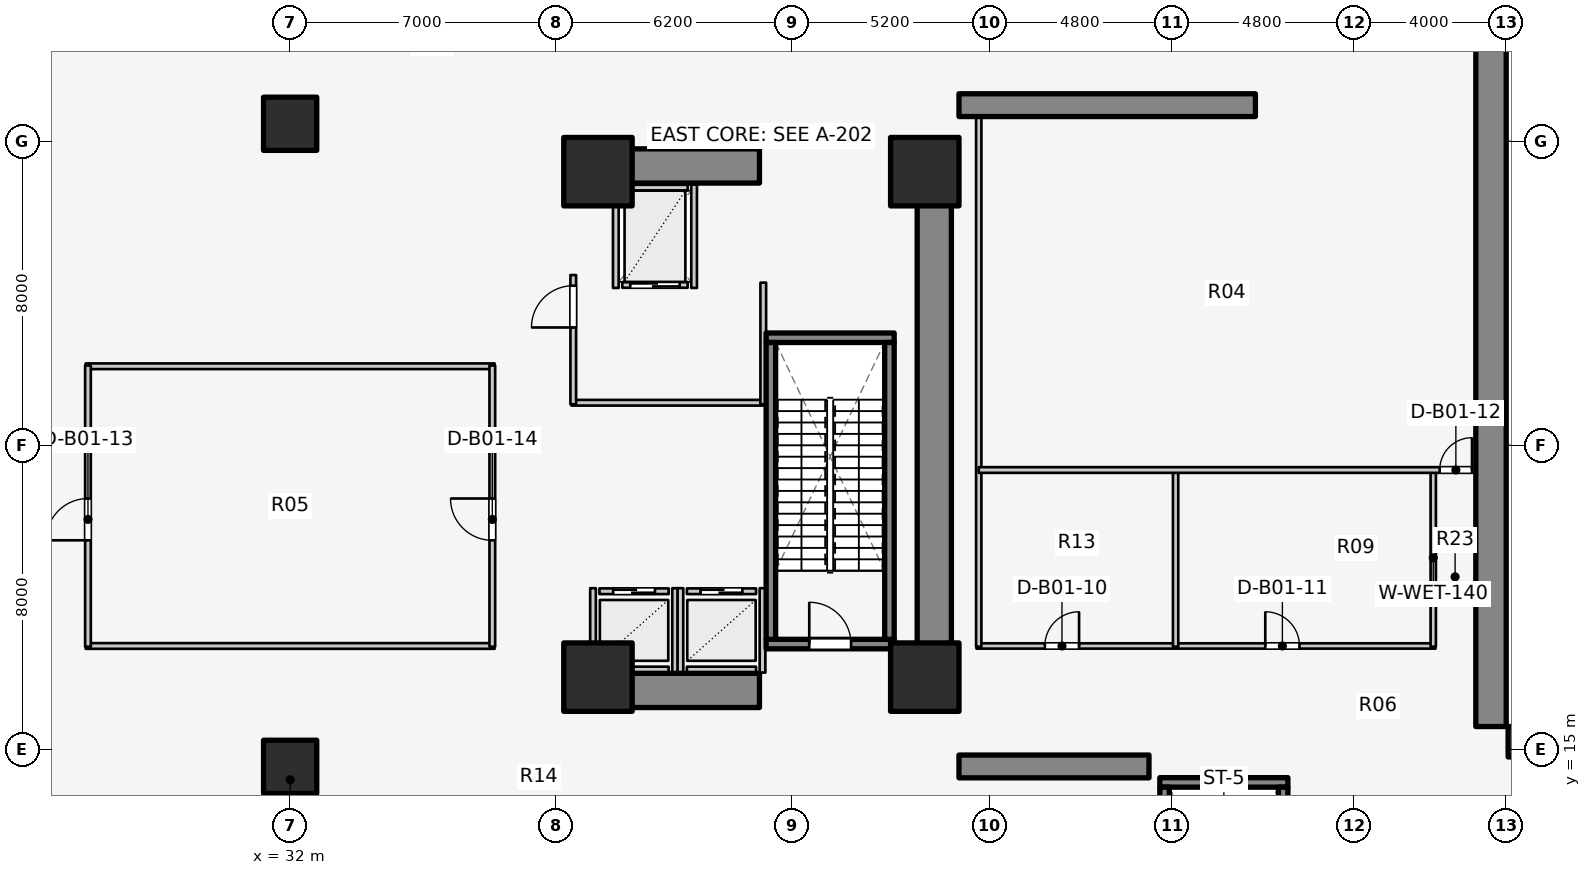
"""IFC4 building model, lengths in metres.
Left out: names, types, materials, properties, quantities, classifications, styles, units other than length and angle.
Written with IfcOpenShell. Run it as: python <this file> out.ifc"""

import sys

from ifc_helpers import new_model, si_unit, direction, frame, frame_2d, origin, origin_2d, place, context, subcontext, project, spatial, rectangle, extrude, element, fill, save


model = new_model("IFC4")
c1 = context("Model", 3, precision=1e-05, world=origin(), true_north=direction((0.0, 1.0)))
c2 = subcontext(c1, "Body", "Model", "MODEL_VIEW")
j1 = project(units=[si_unit("LENGTHUNIT", "METRE"), si_unit("PLANEANGLEUNIT", "RADIAN")], contexts=[c1])
p1 = place(None, origin())
s1 = spatial("IfcSite", under=j1, at=p1, CompositionType="ELEMENT")
p2 = place(p1, origin())
s2 = spatial("IfcBuilding", under=s1, at=p2, CompositionType="ELEMENT")
p3 = place(p2, frame((0.0, 0.0, -5.4)))
s3 = spatial("IfcBuildingStorey", under=s2, at=p3, CompositionType="ELEMENT", Elevation=-5.4)
p4 = place(p3, frame((75.6, 15.2, 0.0), z_axis=(0.0, 0.0, 1.0), x_axis=(-1.0, 0.0, 0.0)))
e1 = element("IfcWall", 1, at=p4, inside=s3, PredefinedType="USERDEFINED", context=c2, shape_type="SweptSolid", body=[
    extrude(rectangle(XDim=11.55, YDim=0.8, at=frame_2d((5.775, 0.0))), origin(), (0.0, 0.0, 1.0), 5.4),
])
p5 = place(p3, frame((63.6, 15.6, 0.0), z_axis=(0.0, 0.0, 1.0), x_axis=(0.0, 1.0, 0.0)))
e2 = element("IfcWall", 2, at=p5, inside=s3, PredefinedType="USERDEFINED", context=c2, shape_type="SweptSolid", body=[
    extrude(rectangle(XDim=29.55, YDim=0.8, at=frame_2d((14.775, 0.0))), origin(), (0.0, 0.0, 1.0), 5.4),
])
p6 = place(p3, frame((49.6, 14.55, 0.0), z_axis=(0.0, 0.0, 1.0), x_axis=(1.0, 0.0, 0.0)))
e3 = element("IfcWall", 3, at=p6, inside=s3, PredefinedType="SOLIDWALL", context=c2, shape_type="SweptSolid", body=[
    extrude(rectangle(XDim=5.0, YDim=0.6, at=frame_2d((2.5, 0.0))), origin(), (0.0, 0.0, 1.0), 5.4),
])
p7 = place(p3, frame((49.6, 31.95, 0.0), z_axis=(0.0, 0.0, 1.0), x_axis=(1.0, 0.0, 0.0)))
e4 = element("IfcWall", 4, at=p7, inside=s3, PredefinedType="SOLIDWALL", context=c2, shape_type="SweptSolid", body=[
    extrude(rectangle(XDim=7.8, YDim=0.6, at=frame_2d((3.9, 0.0))), origin(), (0.0, 0.0, 1.0), 5.4),
])
p8 = place(p3, frame((48.95, 17.05, 0.0), z_axis=(0.0, 0.0, 1.0), x_axis=(0.0, 1.0, 0.0)))
e5 = element("IfcWall", 5, at=p8, inside=s3, PredefinedType="SHEAR", context=c2, shape_type="SweptSolid", body=[
    extrude(rectangle(XDim=12.8, YDim=0.9, at=frame_2d((6.4, 0.0))), origin(), (0.0, 0.0, 1.0), 5.4),
])
for number, where, z_axis, x_axis in (
    (6, (39.85, 16.55, 0.0), (0.0, 0.0, 1.0), (1.0, 0.0, 0.0)),
    (7, (39.85, 30.35, 0.0), (0.0, 0.0, 1.0), (1.0, 0.0, 0.0)),
):
    element("IfcWall", number, at=place(p3, frame(where, z_axis=z_axis, x_axis=x_axis)), inside=s3, PredefinedType="SHEAR", context=c2, shape_type="SweptSolid", body=[
        extrude(rectangle(XDim=4.5, YDim=0.9, at=frame_2d((2.25, 0.0))), origin(), (0.0, 0.0, 1.0), 5.4),
    ])
p9 = place(p3, frame((44.525, 17.77, 0.0), z_axis=(0.0, 0.0, 1.0), x_axis=(1.0, 0.0, 0.0)))
e8 = element("IfcWall", 8, at=p9, inside=s3, PredefinedType="SOLIDWALL", context=c2, shape_type="SweptSolid", body=[
    extrude(rectangle(XDim=3.37, YDim=0.25, at=frame_2d((1.685, 0.0))), origin(), (0.0, 0.0, 1.0), 5.4),
])
p10 = place(p9, frame((1.135, 0.0, 0.0)))
e9 = element("IfcOpeningElement", 9, at=p10, cuts=e8, PredefinedType="OPENING", context=c2, shape_type="SweptSolid", body=[
    extrude(rectangle(XDim=1.1, YDim=2.1, at=frame_2d((0.55, 1.05))), frame((0.0, 0.135, 0.0), z_axis=(0.0, -1.0, 0.0), x_axis=(1.0, 0.0, 0.0)), (0.0, 0.0, 1.0), 0.27),
])
p11 = place(p3, frame((44.525, 25.83, 0.0), z_axis=(0.0, 0.0, 1.0), x_axis=(1.0, 0.0, 0.0)))
e10 = element("IfcWall", 10, at=p11, inside=s3, PredefinedType="SOLIDWALL", context=c2, shape_type="SweptSolid", body=[
    extrude(rectangle(XDim=3.37, YDim=0.25, at=frame_2d((1.685, 0.0))), origin(), (0.0, 0.0, 1.0), 5.4),
])
for number, where, z_axis, x_axis in (
    (11, (44.65, 17.895, 0.0), (0.0, 0.0, 1.0), (0.0, 1.0, 0.0)),
    (12, (47.77, 17.895, 0.0), (0.0, 0.0, 1.0), (0.0, 1.0, 0.0)),
):
    element("IfcWall", number, at=place(p3, frame(where, z_axis=z_axis, x_axis=x_axis)), inside=s3, PredefinedType="SOLIDWALL", context=c2, shape_type="SweptSolid", body=[
        extrude(rectangle(XDim=7.81, YDim=0.25, at=frame_2d((3.905, 0.0))), origin(), (0.0, 0.0, 1.0), 5.4),
    ])
p12 = place(p3, frame((54.885, 14.13, 0.0), z_axis=(0.0, 0.0, 1.0), x_axis=(1.0, 0.0, 0.0)))
e13 = element("IfcWall", 13, at=p12, inside=s3, PredefinedType="SOLIDWALL", context=c2, shape_type="SweptSolid", body=[
    extrude(rectangle(XDim=3.37, YDim=0.25, at=frame_2d((1.685, 0.0))), origin(), (0.0, 0.0, 1.0), 5.4),
])
for number, where, z_axis, x_axis in (
    (14, (55.01, 6.195, 0.0), (0.0, 0.0, 1.0), (0.0, 1.0, 0.0)),
    (15, (58.13, 6.195, 0.0), (0.0, 0.0, 1.0), (0.0, 1.0, 0.0)),
):
    element("IfcWall", number, at=place(p3, frame(where, z_axis=z_axis, x_axis=x_axis)), inside=s3, PredefinedType="SOLIDWALL", context=c2, shape_type="SweptSolid", body=[
        extrude(rectangle(XDim=7.81, YDim=0.25, at=frame_2d((3.905, 0.0))), origin(), (0.0, 0.0, 1.0), 5.4),
    ])
for number, where, z_axis, x_axis in (
    (16, (40.1, 16.9, 0.0), (0.0, 0.0, 1.0), (1.0, 0.0, 0.0)),
    (17, (48.7, 16.9, 0.0), (0.0, 0.0, 1.0), (1.0, 0.0, 0.0)),
    (18, (48.7, 30.2, 0.0), (0.0, 0.0, 1.0), (1.0, 0.0, 0.0)),
    (19, (40.1, 30.2, 0.0), (0.0, 0.0, 1.0), (1.0, 0.0, 0.0)),
):
    element("IfcColumn", number, at=place(p3, frame(where, z_axis=z_axis, x_axis=x_axis)), inside=s3, PredefinedType="COLUMN", context=c2, shape_type="SweptSolid", body=[
        extrude(rectangle(XDim=1.8, YDim=1.8, at=origin_2d()), origin(), (0.0, 0.0, 1.0), 5.4),
    ])
for number, where, z_axis, x_axis in (
    (20, (32.0, 14.54, 0.0), (0.0, 0.0, 1.0), (1.0, 0.0, 0.0)),
    (21, (32.0, 31.46, 0.0), (0.0, 0.0, 1.0), (1.0, 0.0, 0.0)),
):
    element("IfcColumn", number, at=place(p3, frame(where, z_axis=z_axis, x_axis=x_axis)), inside=s3, PredefinedType="COLUMN", context=c2, shape_type="SweptSolid", body=[
        extrude(rectangle(XDim=1.4, YDim=1.4, at=origin_2d()), origin(), (0.0, 0.0, 1.0), 5.4),
    ])
p13 = place(p3, frame((40.14, 19.16, 0.0), z_axis=(0.0, 0.0, 1.0), x_axis=(1.0, 0.0, 0.0)))
e22 = element("IfcWall", 22, at=p13, inside=s3, PredefinedType="SOLIDWALL", context=c2, shape_type="SweptSolid", body=[
    extrude(rectangle(XDim=1.82, YDim=0.15, at=frame_2d((0.91, 0.0))), origin(), (0.0, 0.0, 1.0), 4.42),
])
p14 = place(p13, frame((0.36, 0.0, 0.0)))
e23 = element("IfcOpeningElement", 23, at=p14, cuts=e22, PredefinedType="OPENING", context=c2, shape_type="SweptSolid", body=[
    extrude(rectangle(XDim=1.1, YDim=2.1, at=frame_2d((0.55, 1.05))), frame((0.0, 0.085, 0.0), z_axis=(0.0, -1.0, 0.0), x_axis=(1.0, 0.0, 0.0)), (0.0, 0.0, 1.0), 0.17),
])
p15 = place(p3, frame((40.14, 17.1, 0.0), z_axis=(0.0, 0.0, 1.0), x_axis=(1.0, 0.0, 0.0)))
e24 = element("IfcWall", 24, at=p15, inside=s3, PredefinedType="SOLIDWALL", context=c2, shape_type="SweptSolid", body=[
    extrude(rectangle(XDim=1.82, YDim=0.15, at=frame_2d((0.91, 0.0))), origin(), (0.0, 0.0, 1.0), 4.42),
])
p16 = place(p3, frame((39.97, 17.02, 0.0), z_axis=(0.0, 0.0, 1.0), x_axis=(0.0, 1.0, 0.0)))
e25 = element("IfcWall", 25, at=p16, inside=s3, PredefinedType="SOLIDWALL", context=c2, shape_type="SweptSolid", body=[
    extrude(rectangle(XDim=2.22, YDim=0.15, at=frame_2d((1.11, 0.0))), origin(), (0.0, 0.0, 1.0), 4.1),
])
p17 = place(p3, frame((42.13, 17.02, 0.0), z_axis=(0.0, 0.0, 1.0), x_axis=(0.0, 1.0, 0.0)))
e26 = element("IfcWall", 26, at=p17, inside=s3, PredefinedType="SOLIDWALL", context=c2, shape_type="SweptSolid", body=[
    extrude(rectangle(XDim=2.22, YDim=0.15, at=frame_2d((1.11, 0.0))), origin(), (0.0, 0.0, 1.0), 5.055),
])
p18 = place(p3, frame((42.44, 19.16, 0.0), z_axis=(0.0, 0.0, 1.0), x_axis=(1.0, 0.0, 0.0)))
e27 = element("IfcWall", 27, at=p18, inside=s3, PredefinedType="SOLIDWALL", context=c2, shape_type="SweptSolid", body=[
    extrude(rectangle(XDim=1.82, YDim=0.15, at=frame_2d((0.91, 0.0))), origin(), (0.0, 0.0, 1.0), 5.055),
])
p19 = place(p18, frame((0.36, 0.0, 0.0)))
e28 = element("IfcOpeningElement", 28, at=p19, cuts=e27, PredefinedType="OPENING", context=c2, shape_type="SweptSolid", body=[
    extrude(rectangle(XDim=1.1, YDim=2.1, at=frame_2d((0.55, 1.05))), frame((0.0, 0.085, 0.0), z_axis=(0.0, -1.0, 0.0), x_axis=(1.0, 0.0, 0.0)), (0.0, 0.0, 1.0), 0.17),
])
p20 = place(p3, frame((42.44, 17.1, 0.0), z_axis=(0.0, 0.0, 1.0), x_axis=(1.0, 0.0, 0.0)))
e29 = element("IfcWall", 29, at=p20, inside=s3, PredefinedType="SOLIDWALL", context=c2, shape_type="SweptSolid", body=[
    extrude(rectangle(XDim=1.82, YDim=0.15, at=frame_2d((0.91, 0.0))), origin(), (0.0, 0.0, 1.0), 5.055),
])
p21 = place(p3, frame((42.27, 17.02, 0.0), z_axis=(0.0, 0.0, 1.0), x_axis=(0.0, 1.0, 0.0)))
e30 = element("IfcWall", 30, at=p21, inside=s3, PredefinedType="SOLIDWALL", context=c2, shape_type="SweptSolid", body=[
    extrude(rectangle(XDim=2.22, YDim=0.15, at=frame_2d((1.11, 0.0))), origin(), (0.0, 0.0, 1.0), 5.055),
])
p22 = place(p3, frame((44.43, 17.02, 0.0), z_axis=(0.0, 0.0, 1.0), x_axis=(0.0, 1.0, 0.0)))
e31 = element("IfcWall", 31, at=p22, inside=s3, PredefinedType="SOLIDWALL", context=c2, shape_type="SweptSolid", body=[
    extrude(rectangle(XDim=2.22, YDim=0.15, at=frame_2d((1.11, 0.0))), origin(), (0.0, 0.0, 1.0), 4.42),
])
p23 = place(p3, frame((40.74, 27.22, 0.0), z_axis=(0.0, 0.0, 1.0), x_axis=(1.0, 0.0, 0.0)))
e32 = element("IfcWall", 32, at=p23, inside=s3, PredefinedType="SOLIDWALL", context=c2, shape_type="SweptSolid", body=[
    extrude(rectangle(XDim=1.72, YDim=0.15, at=frame_2d((0.86, 0.0))), origin(), (0.0, 0.0, 1.0), 5.055),
])
p24 = place(p23, frame((0.21, 0.0, 0.0)))
e33 = element("IfcOpeningElement", 33, at=p24, cuts=e32, PredefinedType="OPENING", context=c2, shape_type="SweptSolid", body=[
    extrude(rectangle(XDim=1.3, YDim=2.1, at=frame_2d((0.65, 1.05))), frame((0.0, 0.085, 0.0), z_axis=(0.0, -1.0, 0.0), x_axis=(1.0, 0.0, 0.0)), (0.0, 0.0, 1.0), 0.17),
])
p25 = place(p3, frame((40.74, 29.78, 0.0), z_axis=(0.0, 0.0, 1.0), x_axis=(1.0, 0.0, 0.0)))
e34 = element("IfcWall", 34, at=p25, inside=s3, PredefinedType="SOLIDWALL", context=c2, shape_type="SweptSolid", body=[
    extrude(rectangle(XDim=1.72, YDim=0.15, at=frame_2d((0.86, 0.0))), origin(), (0.0, 0.0, 1.0), 5.055),
])
for number, where, z_axis, x_axis in (
    (35, (40.57, 27.14, 0.0), (0.0, 0.0, 1.0), (0.0, 1.0, 0.0)),
    (36, (42.63, 27.14, 0.0), (0.0, 0.0, 1.0), (0.0, 1.0, 0.0)),
):
    element("IfcWall", number, at=place(p3, frame(where, z_axis=z_axis, x_axis=x_axis)), inside=s3, PredefinedType="SOLIDWALL", context=c2, shape_type="SweptSolid", body=[
        extrude(rectangle(XDim=2.72, YDim=0.15, at=frame_2d((1.36, 0.0))), origin(), (0.0, 0.0, 1.0), 5.055),
    ])
p26 = place(p3, frame((39.4, 24.12, 0.0), z_axis=(0.0, 0.0, 1.0), x_axis=(1.0, 0.0, 0.0)))
e37 = element("IfcWall", 37, at=p26, inside=s3, PredefinedType="PARTITIONING", context=c2, shape_type="SweptSolid", body=[
    extrude(rectangle(XDim=5.08, YDim=0.15, at=frame_2d((2.54, 0.0))), origin(), (0.0, 0.0, 1.0), 4.42),
])
p27 = place(p3, frame((44.45, 24.08, 0.0), z_axis=(0.0, 0.0, 1.0), x_axis=(0.0, 1.0, 0.0)))
e38 = element("IfcWall", 38, at=p27, inside=s3, PredefinedType="PARTITIONING", context=c2, shape_type="SweptSolid", body=[
    extrude(rectangle(XDim=3.2, YDim=0.15, at=frame_2d((1.6, 0.0))), origin(), (0.0, 0.0, 1.0), 5.055),
])
p28 = place(p3, frame((39.45, 24.08, 0.0), z_axis=(0.0, 0.0, 1.0), x_axis=(0.0, 1.0, 0.0)))
e39 = element("IfcWall", 39, at=p28, inside=s3, PredefinedType="PARTITIONING", context=c2, shape_type="SweptSolid", body=[
    extrude(rectangle(XDim=3.4, YDim=0.15, at=frame_2d((1.7, 0.0))), origin(), (0.0, 0.0, 1.0), 5.055),
])
p29 = place(p28, frame((2.02, 0.0, 0.0)))
e40 = element("IfcOpeningElement", 40, at=p29, cuts=e39, PredefinedType="OPENING", context=c2, shape_type="SweptSolid", body=[
    extrude(rectangle(XDim=1.1, YDim=2.1, at=frame_2d((0.55, 1.05))), frame((0.0, 0.085, 0.0), z_axis=(0.0, -1.0, 0.0), x_axis=(1.0, 0.0, 0.0)), (0.0, 0.0, 1.0), 0.17),
])
p30 = place(p3, frame((50.06, 17.72, 0.0), z_axis=(0.0, 0.0, 1.0), x_axis=(1.0, 0.0, 0.0)))
e41 = element("IfcWall", 41, at=p30, inside=s3, PredefinedType="PLUMBINGWALL", context=c2, shape_type="SweptSolid", body=[
    extrude(rectangle(XDim=12.08, YDim=0.14, at=frame_2d((6.04, 0.0))), origin(), (0.0, 0.0, 1.0), 4.1),
])
p31 = place(p30, frame((1.8, 0.0, 0.0)))
e42 = element("IfcOpeningElement", 42, at=p31, cuts=e41, PredefinedType="OPENING", context=c2, shape_type="SweptSolid", body=[
    extrude(rectangle(XDim=0.9, YDim=2.1, at=frame_2d((0.45, 1.05))), frame((0.0, 0.08, 0.0), z_axis=(0.0, -1.0, 0.0), x_axis=(1.0, 0.0, 0.0)), (0.0, 0.0, 1.0), 0.16),
])
p32 = place(p30, frame((7.6, 0.0, 0.0)))
e43 = element("IfcOpeningElement", 43, at=p32, cuts=e41, PredefinedType="OPENING", context=c2, shape_type="SweptSolid", body=[
    extrude(rectangle(XDim=0.9, YDim=2.1, at=frame_2d((0.45, 1.05))), frame((0.0, 0.08, 0.0), z_axis=(0.0, -1.0, 0.0), x_axis=(1.0, 0.0, 0.0)), (0.0, 0.0, 1.0), 0.16),
])
p33 = place(p3, frame((50.12, 17.7, 0.0), z_axis=(0.0, 0.0, 1.0), x_axis=(0.0, 1.0, 0.0)))
e44 = element("IfcWall", 44, at=p33, inside=s3, PredefinedType="PLUMBINGWALL", context=c2, shape_type="SweptSolid", body=[
    extrude(rectangle(XDim=13.92, YDim=0.14, at=frame_2d((6.96, 0.0))), origin(), (0.0, 0.0, 1.0), 4.1),
])
for number, where, z_axis, x_axis in (
    (45, (62.08, 17.7, 0.0), (0.0, 0.0, 1.0), (0.0, 1.0, 0.0)),
    (46, (55.3, 17.7, 0.0), (0.0, 0.0, 1.0), (0.0, 1.0, 0.0)),
):
    element("IfcWall", number, at=place(p3, frame(where, z_axis=z_axis, x_axis=x_axis)), inside=s3, PredefinedType="PLUMBINGWALL", context=c2, shape_type="SweptSolid", body=[
        extrude(rectangle(XDim=4.68, YDim=0.14, at=frame_2d((2.34, 0.0))), origin(), (0.0, 0.0, 1.0), 5.055),
    ])
p34 = place(p3, frame((50.12, 22.35, 0.0), z_axis=(0.0, 0.0, 1.0), x_axis=(1.0, 0.0, 0.0)))
e47 = element("IfcWall", 47, at=p34, inside=s3, PredefinedType="PARTITIONING", context=c2, shape_type="SweptSolid", body=[
    extrude(rectangle(XDim=13.1, YDim=0.15, at=frame_2d((6.55, 0.0))), origin(), (0.0, 0.0, 1.0), 4.1),
])
p35 = place(p34, frame((12.13, 0.0, 0.0)))
e48 = element("IfcOpeningElement", 48, at=p35, cuts=e47, PredefinedType="OPENING", context=c2, shape_type="SweptSolid", body=[
    extrude(rectangle(XDim=0.85, YDim=2.05, at=frame_2d((0.425, 1.025))), frame((0.0, 0.085, 0.0), z_axis=(0.0, -1.0, 0.0), x_axis=(1.0, 0.0, 0.0)), (0.0, 0.0, 1.0), 0.17),
])
for number, where, z_axis, x_axis in (
    (49, (26.62, 17.72, 0.0), (0.0, 0.0, 1.0), (1.0, 0.0, 0.0)),
    (50, (26.62, 25.08, 0.0), (0.0, 0.0, 1.0), (1.0, 0.0, 0.0)),
):
    element("IfcWall", number, at=place(p3, frame(where, z_axis=z_axis, x_axis=x_axis)), inside=s3, PredefinedType="PARTITIONING", context=c2, shape_type="SweptSolid", body=[
        extrude(rectangle(XDim=10.76, YDim=0.15, at=frame_2d((5.38, 0.0))), origin(), (0.0, 0.0, 1.0), 5.055),
    ])
p36 = place(p3, frame((26.68, 17.7, 0.0), z_axis=(0.0, 0.0, 1.0), x_axis=(0.0, 1.0, 0.0)))
e51 = element("IfcWall", 51, at=p36, inside=s3, PredefinedType="PARTITIONING", context=c2, shape_type="SweptSolid", body=[
    extrude(rectangle(XDim=7.4, YDim=0.15, at=frame_2d((3.7, 0.0))), origin(), (0.0, 0.0, 1.0), 5.055),
])
p37 = place(p36, frame((2.8, 0.0, 0.0)))
e52 = element("IfcOpeningElement", 52, at=p37, cuts=e51, PredefinedType="OPENING", context=c2, shape_type="SweptSolid", body=[
    extrude(rectangle(XDim=1.1, YDim=2.1, at=frame_2d((0.55, 1.05))), frame((0.0, 0.085, 0.0), z_axis=(0.0, -1.0, 0.0), x_axis=(1.0, 0.0, 0.0)), (0.0, 0.0, 1.0), 0.17),
])
p38 = place(p3, frame((37.32, 17.7, 0.0), z_axis=(0.0, 0.0, 1.0), x_axis=(0.0, 1.0, 0.0)))
e53 = element("IfcWall", 53, at=p38, inside=s3, PredefinedType="PARTITIONING", context=c2, shape_type="SweptSolid", body=[
    extrude(rectangle(XDim=7.4, YDim=0.15, at=frame_2d((3.7, 0.0))), origin(), (0.0, 0.0, 1.0), 5.055),
])
p39 = place(p38, frame((2.8, 0.0, 0.0)))
e54 = element("IfcOpeningElement", 54, at=p39, cuts=e53, PredefinedType="OPENING", context=c2, shape_type="SweptSolid", body=[
    extrude(rectangle(XDim=1.1, YDim=2.1, at=frame_2d((0.55, 1.05))), frame((0.0, 0.085, 0.0), z_axis=(0.0, -1.0, 0.0), x_axis=(1.0, 0.0, 0.0)), (0.0, 0.0, 1.0), 0.17),
])
p40 = place(p10, origin())
e55 = element("IfcDoor", 55, at=p40, inside=s3, OperationType="SINGLE_SWING_LEFT", PredefinedType="DOOR", context=c2, shape_type="SweptSolid", body=[
    extrude(rectangle(XDim=1.1, YDim=2.1, at=frame_2d((0.55, 1.05))), frame((0.0, 0.025, 0.0), z_axis=(0.0, -1.0, 0.0), x_axis=(1.0, 0.0, 0.0)), (0.0, 0.0, 1.0), 0.05),
])
fill(e9, e55)
p41 = place(p14, origin())
e56 = element("IfcDoor", 56, at=p41, inside=s3, OperationType="DOUBLE_DOOR_SLIDING", PredefinedType="DOOR", context=c2, shape_type="SweptSolid", body=[
    extrude(rectangle(XDim=1.1, YDim=2.1, at=frame_2d((0.55, 1.05))), frame((0.0, 0.025, 0.0), z_axis=(0.0, -1.0, 0.0), x_axis=(1.0, 0.0, 0.0)), (0.0, 0.0, 1.0), 0.05),
])
fill(e23, e56)
p42 = place(p19, origin())
e57 = element("IfcDoor", 57, at=p42, inside=s3, OperationType="DOUBLE_DOOR_SLIDING", PredefinedType="DOOR", context=c2, shape_type="SweptSolid", body=[
    extrude(rectangle(XDim=1.1, YDim=2.1, at=frame_2d((0.55, 1.05))), frame((0.0, 0.025, 0.0), z_axis=(0.0, -1.0, 0.0), x_axis=(1.0, 0.0, 0.0)), (0.0, 0.0, 1.0), 0.05),
])
fill(e28, e57)
p43 = place(p24, origin())
e58 = element("IfcDoor", 58, at=p43, inside=s3, OperationType="DOUBLE_DOOR_SLIDING", PredefinedType="DOOR", context=c2, shape_type="SweptSolid", body=[
    extrude(rectangle(XDim=1.3, YDim=2.1, at=frame_2d((0.65, 1.05))), frame((0.0, 0.025, 0.0), z_axis=(0.0, -1.0, 0.0), x_axis=(1.0, 0.0, 0.0)), (0.0, 0.0, 1.0), 0.05),
])
fill(e33, e58)
p44 = place(p29, origin())
e59 = element("IfcDoor", 59, at=p44, inside=s3, OperationType="SINGLE_SWING_LEFT", PredefinedType="DOOR", context=c2, shape_type="SweptSolid", body=[
    extrude(rectangle(XDim=1.1, YDim=2.1, at=frame_2d((0.55, 1.05))), frame((0.0, 0.025, 0.0), z_axis=(0.0, -1.0, 0.0), x_axis=(1.0, 0.0, 0.0)), (0.0, 0.0, 1.0), 0.05),
])
fill(e40, e59)
p45 = place(p31, origin())
e60 = element("IfcDoor", 60, at=p45, inside=s3, OperationType="SINGLE_SWING_RIGHT", PredefinedType="DOOR", context=c2, shape_type="SweptSolid", body=[
    extrude(rectangle(XDim=0.9, YDim=2.1, at=frame_2d((0.45, 1.05))), frame((0.0, 0.025, 0.0), z_axis=(0.0, -1.0, 0.0), x_axis=(1.0, 0.0, 0.0)), (0.0, 0.0, 1.0), 0.05),
])
fill(e42, e60)
p46 = place(p32, origin())
e61 = element("IfcDoor", 61, at=p46, inside=s3, OperationType="SINGLE_SWING_LEFT", PredefinedType="DOOR", context=c2, shape_type="SweptSolid", body=[
    extrude(rectangle(XDim=0.9, YDim=2.1, at=frame_2d((0.45, 1.05))), frame((0.0, 0.025, 0.0), z_axis=(0.0, -1.0, 0.0), x_axis=(1.0, 0.0, 0.0)), (0.0, 0.0, 1.0), 0.05),
])
fill(e43, e61)
p47 = place(p35, origin())
e62 = element("IfcDoor", 62, at=p47, inside=s3, OperationType="SINGLE_SWING_RIGHT", PredefinedType="DOOR", context=c2, shape_type="SweptSolid", body=[
    extrude(rectangle(XDim=0.85, YDim=2.05, at=frame_2d((0.425, 1.025))), frame((0.0, 0.025, 0.0), z_axis=(0.0, -1.0, 0.0), x_axis=(1.0, 0.0, 0.0)), (0.0, 0.0, 1.0), 0.05),
])
fill(e48, e62)
p48 = place(p37, origin())
e63 = element("IfcDoor", 63, at=p48, inside=s3, OperationType="SINGLE_SWING_LEFT", PredefinedType="DOOR", context=c2, shape_type="SweptSolid", body=[
    extrude(rectangle(XDim=1.1, YDim=2.1, at=frame_2d((0.55, 1.05))), frame((0.0, 0.025, 0.0), z_axis=(0.0, -1.0, 0.0), x_axis=(1.0, 0.0, 0.0)), (0.0, 0.0, 1.0), 0.05),
])
fill(e52, e63)
p49 = place(p39, origin())
e64 = element("IfcDoor", 64, at=p49, inside=s3, OperationType="SINGLE_SWING_RIGHT", PredefinedType="DOOR", context=c2, shape_type="SweptSolid", body=[
    extrude(rectangle(XDim=1.1, YDim=2.1, at=frame_2d((0.55, 1.05))), frame((0.0, 0.025, 0.0), z_axis=(0.0, -1.0, 0.0), x_axis=(1.0, 0.0, 0.0)), (0.0, 0.0, 1.0), 0.05),
])
fill(e54, e64)
save(model, sys.argv[1])
